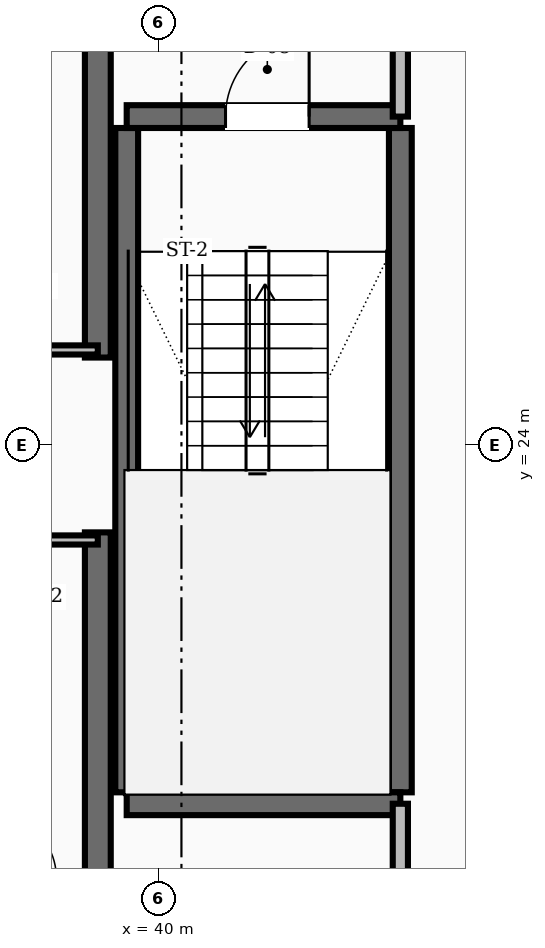
"""IFC4 building model, lengths in metres.
Left out: names, types, materials, properties, quantities, classifications, styles, units other than length and angle.
Written with IfcOpenShell. Run it as: python <this file> out.ifc"""

import sys

from ifc_helpers import new_model, si_unit, direction, frame, frame_2d, origin, place, context, subcontext, project, spatial, rectangle, extrude, element, fill, save


model = new_model("IFC4")
c1 = context("Model", 3, precision=1e-05, world=origin(), true_north=direction((0.0, 1.0)))
c2 = subcontext(c1, "Body", "Model", "MODEL_VIEW")
j1 = project(units=[si_unit("LENGTHUNIT", "METRE"), si_unit("PLANEANGLEUNIT", "RADIAN")], contexts=[c1])
p1 = place(None, origin())
s1 = spatial("IfcSite", under=j1, at=p1, CompositionType="ELEMENT")
p2 = place(p1, origin())
s2 = spatial("IfcBuilding", under=s1, at=p2, CompositionType="ELEMENT")
p3 = place(p2, frame((0.0, 0.0, 164.0)))
s3 = spatial("IfcBuildingStorey", under=s2, at=p3, CompositionType="ELEMENT", Elevation=164.0)
for number, where, z_axis, x_axis in (
    (1, (39.2, 16.55, 0.0), (0.0, 0.0, 1.0), (0.0, 1.0, 0.0)),
    (2, (39.2, 25.15, 0.0), (0.0, 0.0, 1.0), (0.0, 1.0, 0.0)),
):
    element("IfcWall", number, at=place(p3, frame(where, z_axis=z_axis, x_axis=x_axis)), inside=s3, PredefinedType="SHEAR", context=c2, shape_type="SweptSolid", body=[
        extrude(rectangle(XDim=6.3, YDim=0.34, at=frame_2d((3.15, 0.0))), origin(), (0.0, 0.0, 1.0), 3.6),
    ])
for number, where, z_axis, x_axis in (
    (3, (43.18, 19.43, 0.0), (0.0, 0.0, 1.0), (0.0, 1.0, 0.0)),
    (4, (39.58, 19.43, 0.0), (0.0, 0.0, 1.0), (0.0, 1.0, 0.0)),
):
    element("IfcWall", number, at=place(p3, frame(where, z_axis=z_axis, x_axis=x_axis)), inside=s3, PredefinedType="SHEAR", context=c2, shape_type="SweptSolid", body=[
        extrude(rectangle(XDim=8.74, YDim=0.3, at=frame_2d((4.37, 0.0))), origin(), (0.0, 0.0, 1.0), 3.6),
    ])
p4 = place(p3, frame((39.58, 19.28, 0.0), z_axis=(0.0, 0.0, 1.0), x_axis=(1.0, 0.0, 0.0)))
e5 = element("IfcWall", 5, at=p4, inside=s3, PredefinedType="SHEAR", context=c2, shape_type="SweptSolid", body=[
    extrude(rectangle(XDim=3.6, YDim=0.3, at=frame_2d((1.8, 0.0))), origin(), (0.0, 0.0, 1.0), 3.6),
])
p5 = place(p3, frame((39.58, 28.32, 0.0), z_axis=(0.0, 0.0, 1.0), x_axis=(1.0, 0.0, 0.0)))
e6 = element("IfcWall", 6, at=p5, inside=s3, PredefinedType="SHEAR", context=c2, shape_type="SweptSolid", body=[
    extrude(rectangle(XDim=3.6, YDim=0.3, at=frame_2d((1.8, 0.0))), origin(), (0.0, 0.0, 1.0), 3.6),
])
p6 = place(p5, frame((1.3, 0.0, 0.0)))
e7 = element("IfcOpeningElement", 7, at=p6, cuts=e6, PredefinedType="OPENING", context=c2, shape_type="SweptSolid", body=[
    extrude(rectangle(XDim=1.1, YDim=2.1, at=frame_2d((0.55, 1.05))), frame((0.0, 0.16, 0.0), z_axis=(0.0, -1.0, 0.0), x_axis=(1.0, 0.0, 0.0)), (0.0, 0.0, 1.0), 0.32),
])
p7 = place(p3, frame((43.18, 28.32, 0.0), z_axis=(0.0, 0.0, 1.0), x_axis=(0.0, 1.0, 0.0)))
e8 = element("IfcWall", 8, at=p7, inside=s3, PredefinedType="SOLIDWALL", context=c2, shape_type="SweptSolid", body=[
    extrude(rectangle(XDim=3.13, YDim=0.2, at=frame_2d((1.565, 0.0))), origin(), (0.0, 0.0, 1.0), 2.8),
])
p8 = place(p7, frame((1.015, 0.0, 0.0)))
e9 = element("IfcOpeningElement", 9, at=p8, cuts=e8, PredefinedType="OPENING", context=c2, shape_type="SweptSolid", body=[
    extrude(rectangle(XDim=1.1, YDim=2.1, at=frame_2d((0.55, 1.05))), frame((0.0, 0.11, 0.0), z_axis=(0.0, -1.0, 0.0), x_axis=(1.0, 0.0, 0.0)), (0.0, 0.0, 1.0), 0.22),
])
p9 = place(p3, frame((43.18, 16.55, 0.0), z_axis=(0.0, 0.0, 1.0), x_axis=(0.0, 1.0, 0.0)))
e10 = element("IfcWall", 10, at=p9, inside=s3, PredefinedType="SOLIDWALL", context=c2, shape_type="SweptSolid", body=[
    extrude(rectangle(XDim=2.73, YDim=0.2, at=frame_2d((1.365, 0.0))), origin(), (0.0, 0.0, 1.0), 2.8),
])
p10 = place(p9, frame((0.89, 0.0, 0.0)))
e11 = element("IfcOpeningElement", 11, at=p10, cuts=e10, PredefinedType="OPENING", context=c2, shape_type="SweptSolid", body=[
    extrude(rectangle(XDim=0.95, YDim=2.1, at=frame_2d((0.475, 1.05))), frame((0.0, 0.11, 0.0), z_axis=(0.0, -1.0, 0.0), x_axis=(1.0, 0.0, 0.0)), (0.0, 0.0, 1.0), 0.22),
])
for number, where, z_axis, x_axis in (
    (12, (37.4, 25.25, 0.0), (0.0, 0.0, 1.0), (1.0, 0.0, 0.0)),
    (13, (37.4, 22.75, 0.0), (0.0, 0.0, 1.0), (1.0, 0.0, 0.0)),
):
    element("IfcWall", number, at=place(p3, frame(where, z_axis=z_axis, x_axis=x_axis)), inside=s3, PredefinedType="PARTITIONING", context=c2, shape_type="SweptSolid", body=[
        extrude(rectangle(XDim=1.8, YDim=0.12, at=frame_2d((0.9, 0.0))), origin(), (0.0, 0.0, 1.0), 2.8),
    ])
p11 = place(p6, origin())
e14 = element("IfcDoor", 14, at=p11, inside=s3, OperationType="SINGLE_SWING_RIGHT", PredefinedType="DOOR", context=c2, shape_type="SweptSolid", body=[
    extrude(rectangle(XDim=1.1, YDim=2.1, at=frame_2d((0.55, 1.05))), frame((0.0, 0.025, 0.0), z_axis=(0.0, -1.0, 0.0), x_axis=(1.0, 0.0, 0.0)), (0.0, 0.0, 1.0), 0.05),
])
fill(e7, e14)
save(model, sys.argv[1])
